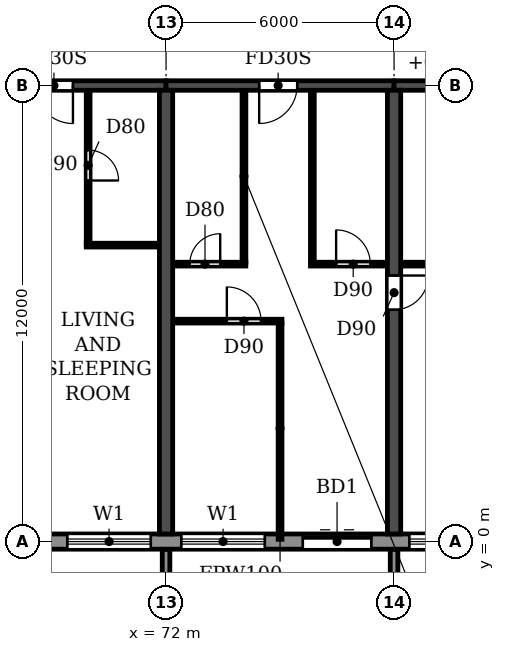
"""IFC4 building model, lengths in metres.
Left out: names, types, materials, properties, quantities, classifications, styles, units other than length and angle.
Written with IfcOpenShell. Run it as: python <this file> out.ifc"""

import sys

from ifc_helpers import new_model, si_unit, direction, frame, frame_2d, origin, place, context, subcontext, project, spatial, polyline, rectangle, outline, extrude, source, transform, mapped, element, fill, save


model = new_model("IFC4")
c1 = context("Model", 3, precision=1e-05, world=origin(), true_north=direction((0.0, 1.0)))
c2 = subcontext(c1, "Body", "Model", "MODEL_VIEW")
j1 = project(units=[si_unit("LENGTHUNIT", "METRE"), si_unit("PLANEANGLEUNIT", "RADIAN")], contexts=[c1])
p1 = place(None, origin())
s1 = spatial("IfcSite", under=j1, at=p1, CompositionType="ELEMENT")
p2 = place(p1, origin())
s2 = spatial("IfcBuilding", under=s1, at=p2, CompositionType="ELEMENT")
p3 = place(p2, frame((0.0, 0.0, 72.9)))
s3 = spatial("IfcBuildingStorey", under=s2, at=p3, CompositionType="ELEMENT", Elevation=72.9)
p4 = place(p3, frame((72.0, 0.2, 0.0), z_axis=(0.0, 0.0, 1.0), x_axis=(0.0, 1.0, 0.0)))
e1 = element("IfcWall", 1, at=p4, inside=s3, PredefinedType="SHEAR", context=c2, shape_type="SweptSolid", body=[
    extrude(rectangle(XDim=11.675, YDim=0.35, at=frame_2d((5.837, 0.0))), origin(), (0.0, 0.0, 1.0), 3.06),
])
p5 = place(p3, frame((78.0, 0.2, 0.0), z_axis=(0.0, 0.0, 1.0), x_axis=(0.0, 1.0, 0.0)))
e2 = element("IfcWall", 2, at=p5, inside=s3, PredefinedType="SHEAR", context=c2, shape_type="SweptSolid", body=[
    extrude(rectangle(XDim=11.675, YDim=0.35, at=frame_2d((5.837, 0.0))), origin(), (0.0, 0.0, 1.0), 3.06),
])
p6 = place(p5, frame((5.9, 0.0, 0.0)))
e3 = element("IfcOpeningElement", 3, at=p6, cuts=e2, PredefinedType="OPENING", context=c2, shape_type="SweptSolid", body=[
    extrude(rectangle(XDim=0.9, YDim=2.1, at=frame_2d((0.45, 1.05))), frame((0.0, 0.185, 0.0), z_axis=(0.0, -1.0, 0.0), x_axis=(1.0, 0.0, 0.0)), (0.0, 0.0, 1.0), 0.37),
])
p7 = place(p3, frame((66.0, 12.0, 0.0), z_axis=(0.0, 0.0, 1.0), x_axis=(1.0, 0.0, 0.0)))
e4 = element("IfcWall", 4, at=p7, inside=s3, PredefinedType="SHEAR", context=c2, shape_type="SweptSolid", body=[
    extrude(rectangle(XDim=6.0, YDim=0.25, at=frame_2d((3.0, 0.0))), origin(), (0.0, 0.0, 1.0), 2.46),
])
p8 = place(p7, frame((2.55, 0.0, 0.0)))
e5 = element("IfcOpeningElement", 5, at=p8, cuts=e4, PredefinedType="OPENING", context=c2, shape_type="SweptSolid", body=[
    extrude(rectangle(XDim=1.0, YDim=2.1, at=frame_2d((0.5, 1.05))), frame((0.0, 0.135, 0.0), z_axis=(0.0, -1.0, 0.0), x_axis=(1.0, 0.0, 0.0)), (0.0, 0.0, 1.0), 0.27),
])
p9 = place(p3, frame((72.0, 12.0, 0.0), z_axis=(0.0, 0.0, 1.0), x_axis=(1.0, 0.0, 0.0)))
e6 = element("IfcWall", 6, at=p9, inside=s3, PredefinedType="SHEAR", context=c2, shape_type="SweptSolid", body=[
    extrude(rectangle(XDim=6.0, YDim=0.25, at=frame_2d((3.0, 0.0))), origin(), (0.0, 0.0, 1.0), 2.46),
])
p10 = place(p9, frame((2.45, 0.0, 0.0)))
e7 = element("IfcOpeningElement", 7, at=p10, cuts=e6, PredefinedType="OPENING", context=c2, shape_type="SweptSolid", body=[
    extrude(rectangle(XDim=1.0, YDim=2.1, at=frame_2d((0.5, 1.05))), frame((0.0, 0.135, 0.0), z_axis=(0.0, -1.0, 0.0), x_axis=(1.0, 0.0, 0.0)), (0.0, 0.0, 1.0), 0.27),
])
p11 = place(p3, frame((78.0, 12.0, 0.0), z_axis=(0.0, 0.0, 1.0), x_axis=(1.0, 0.0, 0.0)))
e8 = element("IfcWall", 8, at=p11, inside=s3, PredefinedType="SHEAR", context=c2, shape_type="SweptSolid", body=[
    extrude(rectangle(XDim=6.0, YDim=0.25, at=frame_2d((3.0, 0.0))), origin(), (0.0, 0.0, 1.0), 2.46),
])
p12 = place(p3, frame((10.683, 0.0, 0.0), z_axis=(0.0, 0.0, 1.0), x_axis=(1.0, 0.0, 0.0)))
e9 = element("IfcWall", 9, at=p12, inside=s3, PredefinedType="STANDARD", context=c2, shape_type="SweptSolid", body=[
    extrude(rectangle(XDim=80.634, YDim=0.4, at=frame_2d((40.317, 0.0))), origin(), (0.0, 0.0, 1.0), 3.06),
])
p13 = place(p12, frame((1.717, 0.0, 0.9)))
e10 = element("IfcOpeningElement", 10, at=p13, cuts=e9, PredefinedType="OPENING", context=c2, shape_type="SweptSolid", body=[
    extrude(rectangle(XDim=2.2, YDim=1.5, at=frame_2d((1.1, 0.75))), frame((0.0, 0.21, 0.0), z_axis=(0.0, -1.0, 0.0), x_axis=(1.0, 0.0, 0.0)), (0.0, 0.0, 1.0), 0.42),
])
p14 = place(p12, frame((4.917, 0.0, 0.0)))
e11 = element("IfcOpeningElement", 11, at=p14, cuts=e9, PredefinedType="OPENING", context=c2, shape_type="SweptSolid", body=[
    extrude(rectangle(XDim=1.8, YDim=2.4, at=frame_2d((0.9, 1.2))), frame((0.0, 0.21, 0.0), z_axis=(0.0, -1.0, 0.0), x_axis=(1.0, 0.0, 0.0)), (0.0, 0.0, 1.0), 0.42),
])
p15 = place(p12, frame((7.717, 0.0, 0.9)))
e12 = element("IfcOpeningElement", 12, at=p15, cuts=e9, PredefinedType="OPENING", context=c2, shape_type="SweptSolid", body=[
    extrude(rectangle(XDim=2.2, YDim=1.5, at=frame_2d((1.1, 0.75))), frame((0.0, 0.21, 0.0), z_axis=(0.0, -1.0, 0.0), x_axis=(1.0, 0.0, 0.0)), (0.0, 0.0, 1.0), 0.42),
])
p16 = place(p12, frame((10.717, 0.0, 0.9)))
e13 = element("IfcOpeningElement", 13, at=p16, cuts=e9, PredefinedType="OPENING", context=c2, shape_type="SweptSolid", body=[
    extrude(rectangle(XDim=2.2, YDim=1.5, at=frame_2d((1.1, 0.75))), frame((0.0, 0.21, 0.0), z_axis=(0.0, -1.0, 0.0), x_axis=(1.0, 0.0, 0.0)), (0.0, 0.0, 1.0), 0.42),
])
p17 = place(p12, frame((13.717, 0.0, 0.9)))
e14 = element("IfcOpeningElement", 14, at=p17, cuts=e9, PredefinedType="OPENING", context=c2, shape_type="SweptSolid", body=[
    extrude(rectangle(XDim=2.2, YDim=1.5, at=frame_2d((1.1, 0.75))), frame((0.0, 0.21, 0.0), z_axis=(0.0, -1.0, 0.0), x_axis=(1.0, 0.0, 0.0)), (0.0, 0.0, 1.0), 0.42),
])
p18 = place(p12, frame((16.917, 0.0, 0.0)))
e15 = element("IfcOpeningElement", 15, at=p18, cuts=e9, PredefinedType="OPENING", context=c2, shape_type="SweptSolid", body=[
    extrude(rectangle(XDim=1.8, YDim=2.4, at=frame_2d((0.9, 1.2))), frame((0.0, 0.21, 0.0), z_axis=(0.0, -1.0, 0.0), x_axis=(1.0, 0.0, 0.0)), (0.0, 0.0, 1.0), 0.42),
])
p19 = place(p12, frame((19.717, 0.0, 0.9)))
e16 = element("IfcOpeningElement", 16, at=p19, cuts=e9, PredefinedType="OPENING", context=c2, shape_type="SweptSolid", body=[
    extrude(rectangle(XDim=2.2, YDim=1.5, at=frame_2d((1.1, 0.75))), frame((0.0, 0.21, 0.0), z_axis=(0.0, -1.0, 0.0), x_axis=(1.0, 0.0, 0.0)), (0.0, 0.0, 1.0), 0.42),
])
p20 = place(p12, frame((22.717, 0.0, 0.9)))
e17 = element("IfcOpeningElement", 17, at=p20, cuts=e9, PredefinedType="OPENING", context=c2, shape_type="SweptSolid", body=[
    extrude(rectangle(XDim=2.2, YDim=1.5, at=frame_2d((1.1, 0.75))), frame((0.0, 0.21, 0.0), z_axis=(0.0, -1.0, 0.0), x_axis=(1.0, 0.0, 0.0)), (0.0, 0.0, 1.0), 0.42),
])
p21 = place(p12, frame((25.917, 0.0, 0.0)))
e18 = element("IfcOpeningElement", 18, at=p21, cuts=e9, PredefinedType="OPENING", context=c2, shape_type="SweptSolid", body=[
    extrude(rectangle(XDim=1.8, YDim=2.4, at=frame_2d((0.9, 1.2))), frame((0.0, 0.21, 0.0), z_axis=(0.0, -1.0, 0.0), x_axis=(1.0, 0.0, 0.0)), (0.0, 0.0, 1.0), 0.42),
])
p22 = place(p12, frame((28.717, 0.0, 0.9)))
e19 = element("IfcOpeningElement", 19, at=p22, cuts=e9, PredefinedType="OPENING", context=c2, shape_type="SweptSolid", body=[
    extrude(rectangle(XDim=2.2, YDim=1.5, at=frame_2d((1.1, 0.75))), frame((0.0, 0.21, 0.0), z_axis=(0.0, -1.0, 0.0), x_axis=(1.0, 0.0, 0.0)), (0.0, 0.0, 1.0), 0.42),
])
p23 = place(p12, frame((31.717, 0.0, 0.9)))
e20 = element("IfcOpeningElement", 20, at=p23, cuts=e9, PredefinedType="OPENING", context=c2, shape_type="SweptSolid", body=[
    extrude(rectangle(XDim=2.2, YDim=1.5, at=frame_2d((1.1, 0.75))), frame((0.0, 0.21, 0.0), z_axis=(0.0, -1.0, 0.0), x_axis=(1.0, 0.0, 0.0)), (0.0, 0.0, 1.0), 0.42),
])
p24 = place(p12, frame((34.717, 0.0, 0.9)))
e21 = element("IfcOpeningElement", 21, at=p24, cuts=e9, PredefinedType="OPENING", context=c2, shape_type="SweptSolid", body=[
    extrude(rectangle(XDim=2.2, YDim=1.5, at=frame_2d((1.1, 0.75))), frame((0.0, 0.21, 0.0), z_axis=(0.0, -1.0, 0.0), x_axis=(1.0, 0.0, 0.0)), (0.0, 0.0, 1.0), 0.42),
])
p25 = place(p12, frame((37.917, 0.0, 0.0)))
e22 = element("IfcOpeningElement", 22, at=p25, cuts=e9, PredefinedType="OPENING", context=c2, shape_type="SweptSolid", body=[
    extrude(rectangle(XDim=1.8, YDim=2.4, at=frame_2d((0.9, 1.2))), frame((0.0, 0.21, 0.0), z_axis=(0.0, -1.0, 0.0), x_axis=(1.0, 0.0, 0.0)), (0.0, 0.0, 1.0), 0.42),
])
p26 = place(p12, frame((40.717, 0.0, 0.9)))
e23 = element("IfcOpeningElement", 23, at=p26, cuts=e9, PredefinedType="OPENING", context=c2, shape_type="SweptSolid", body=[
    extrude(rectangle(XDim=2.2, YDim=1.5, at=frame_2d((1.1, 0.75))), frame((0.0, 0.21, 0.0), z_axis=(0.0, -1.0, 0.0), x_axis=(1.0, 0.0, 0.0)), (0.0, 0.0, 1.0), 0.42),
])
p27 = place(p12, frame((43.717, 0.0, 0.9)))
e24 = element("IfcOpeningElement", 24, at=p27, cuts=e9, PredefinedType="OPENING", context=c2, shape_type="SweptSolid", body=[
    extrude(rectangle(XDim=2.2, YDim=1.5, at=frame_2d((1.1, 0.75))), frame((0.0, 0.21, 0.0), z_axis=(0.0, -1.0, 0.0), x_axis=(1.0, 0.0, 0.0)), (0.0, 0.0, 1.0), 0.42),
])
p28 = place(p12, frame((46.717, 0.0, 0.9)))
e25 = element("IfcOpeningElement", 25, at=p28, cuts=e9, PredefinedType="OPENING", context=c2, shape_type="SweptSolid", body=[
    extrude(rectangle(XDim=2.2, YDim=1.5, at=frame_2d((1.1, 0.75))), frame((0.0, 0.21, 0.0), z_axis=(0.0, -1.0, 0.0), x_axis=(1.0, 0.0, 0.0)), (0.0, 0.0, 1.0), 0.42),
])
p29 = place(p12, frame((49.917, 0.0, 0.0)))
e26 = element("IfcOpeningElement", 26, at=p29, cuts=e9, PredefinedType="OPENING", context=c2, shape_type="SweptSolid", body=[
    extrude(rectangle(XDim=1.8, YDim=2.4, at=frame_2d((0.9, 1.2))), frame((0.0, 0.21, 0.0), z_axis=(0.0, -1.0, 0.0), x_axis=(1.0, 0.0, 0.0)), (0.0, 0.0, 1.0), 0.42),
])
p30 = place(p12, frame((52.717, 0.0, 0.9)))
e27 = element("IfcOpeningElement", 27, at=p30, cuts=e9, PredefinedType="OPENING", context=c2, shape_type="SweptSolid", body=[
    extrude(rectangle(XDim=2.2, YDim=1.5, at=frame_2d((1.1, 0.75))), frame((0.0, 0.21, 0.0), z_axis=(0.0, -1.0, 0.0), x_axis=(1.0, 0.0, 0.0)), (0.0, 0.0, 1.0), 0.42),
])
p31 = place(p12, frame((55.717, 0.0, 0.9)))
e28 = element("IfcOpeningElement", 28, at=p31, cuts=e9, PredefinedType="OPENING", context=c2, shape_type="SweptSolid", body=[
    extrude(rectangle(XDim=2.2, YDim=1.5, at=frame_2d((1.1, 0.75))), frame((0.0, 0.21, 0.0), z_axis=(0.0, -1.0, 0.0), x_axis=(1.0, 0.0, 0.0)), (0.0, 0.0, 1.0), 0.42),
])
p32 = place(p12, frame((58.717, 0.0, 0.9)))
e29 = element("IfcOpeningElement", 29, at=p32, cuts=e9, PredefinedType="OPENING", context=c2, shape_type="SweptSolid", body=[
    extrude(rectangle(XDim=2.2, YDim=1.5, at=frame_2d((1.1, 0.75))), frame((0.0, 0.21, 0.0), z_axis=(0.0, -1.0, 0.0), x_axis=(1.0, 0.0, 0.0)), (0.0, 0.0, 1.0), 0.42),
])
p33 = place(p12, frame((61.717, 0.0, 0.9)))
e30 = element("IfcOpeningElement", 30, at=p33, cuts=e9, PredefinedType="OPENING", context=c2, shape_type="SweptSolid", body=[
    extrude(rectangle(XDim=2.2, YDim=1.5, at=frame_2d((1.1, 0.75))), frame((0.0, 0.21, 0.0), z_axis=(0.0, -1.0, 0.0), x_axis=(1.0, 0.0, 0.0)), (0.0, 0.0, 1.0), 0.42),
])
p34 = place(p12, frame((64.917, 0.0, 0.0)))
e31 = element("IfcOpeningElement", 31, at=p34, cuts=e9, PredefinedType="OPENING", context=c2, shape_type="SweptSolid", body=[
    extrude(rectangle(XDim=1.8, YDim=2.4, at=frame_2d((0.9, 1.2))), frame((0.0, 0.21, 0.0), z_axis=(0.0, -1.0, 0.0), x_axis=(1.0, 0.0, 0.0)), (0.0, 0.0, 1.0), 0.42),
])
p35 = place(p12, frame((67.717, 0.0, 0.9)))
e32 = element("IfcOpeningElement", 32, at=p35, cuts=e9, PredefinedType="OPENING", context=c2, shape_type="SweptSolid", body=[
    extrude(rectangle(XDim=2.2, YDim=1.5, at=frame_2d((1.1, 0.75))), frame((0.0, 0.21, 0.0), z_axis=(0.0, -1.0, 0.0), x_axis=(1.0, 0.0, 0.0)), (0.0, 0.0, 1.0), 0.42),
])
p36 = place(p12, frame((70.717, 0.0, 0.9)))
e33 = element("IfcOpeningElement", 33, at=p36, cuts=e9, PredefinedType="OPENING", context=c2, shape_type="SweptSolid", body=[
    extrude(rectangle(XDim=2.2, YDim=1.5, at=frame_2d((1.1, 0.75))), frame((0.0, 0.21, 0.0), z_axis=(0.0, -1.0, 0.0), x_axis=(1.0, 0.0, 0.0)), (0.0, 0.0, 1.0), 0.42),
])
p37 = place(p12, frame((73.917, 0.0, 0.0)))
e34 = element("IfcOpeningElement", 34, at=p37, cuts=e9, PredefinedType="OPENING", context=c2, shape_type="SweptSolid", body=[
    extrude(rectangle(XDim=1.8, YDim=2.4, at=frame_2d((0.9, 1.2))), frame((0.0, 0.21, 0.0), z_axis=(0.0, -1.0, 0.0), x_axis=(1.0, 0.0, 0.0)), (0.0, 0.0, 1.0), 0.42),
])
p38 = place(p12, frame((76.717, 0.0, 0.9)))
e35 = element("IfcOpeningElement", 35, at=p38, cuts=e9, PredefinedType="OPENING", context=c2, shape_type="SweptSolid", body=[
    extrude(rectangle(XDim=2.2, YDim=1.5, at=frame_2d((1.1, 0.75))), frame((0.0, 0.21, 0.0), z_axis=(0.0, -1.0, 0.0), x_axis=(1.0, 0.0, 0.0)), (0.0, 0.0, 1.0), 0.42),
])
m1 = source(origin(), c2, "Body", "SweptSolid", [
    extrude(outline(polyline([(0.0, 0.0), (0.2, 0.0), (0.2, 1.65), (0.0, 1.65), (0.0, 0.0)])), origin(), (0.0, 0.0, 1.0), 3.1),
])
for number, where in (
    (36, (71.9, -1.85, 0.0)),
    (37, (77.9, -1.85, 0.0)),
):
    element("IfcWall", number, at=place(p3, frame(where)), inside=s3, PredefinedType="STANDARD", context=c2, shape_type="MappedRepresentation", body=[
        mapped(m1, transform((0.0, 0.0, 0.0))),
    ])
p39 = place(p3, frame((72.185, 5.8, 0.0), z_axis=(0.0, 0.0, 1.0), x_axis=(1.0, 0.0, 0.0)))
e38 = element("IfcWall", 38, at=p39, inside=s3, PredefinedType="PARTITIONING", context=c2, shape_type="SweptSolid", body=[
    extrude(rectangle(XDim=2.865, YDim=0.1, at=frame_2d((1.433, 0.0))), origin(), (0.0, 0.0, 1.0), 3.06),
])
p40 = place(p39, frame((1.415, 0.0, 0.0)))
e39 = element("IfcOpeningElement", 39, at=p40, cuts=e38, PredefinedType="OPENING", context=c2, shape_type="SweptSolid", body=[
    extrude(rectangle(XDim=0.9, YDim=2.1, at=frame_2d((0.45, 1.05))), frame((0.0, 0.06, 0.0), z_axis=(0.0, -1.0, 0.0), x_axis=(1.0, 0.0, 0.0)), (0.0, 0.0, 1.0), 0.12),
])
p41 = place(p3, frame((72.185, 7.3, 0.0), z_axis=(0.0, 0.0, 1.0), x_axis=(1.0, 0.0, 0.0)))
e40 = element("IfcWall", 40, at=p41, inside=s3, PredefinedType="PARTITIONING", context=c2, shape_type="SweptSolid", body=[
    extrude(rectangle(XDim=1.915, YDim=0.1, at=frame_2d((0.958, 0.0))), origin(), (0.0, 0.0, 1.0), 3.06),
])
p42 = place(p41, frame((0.44, 0.0, 0.0)))
e41 = element("IfcOpeningElement", 41, at=p42, cuts=e40, PredefinedType="OPENING", context=c2, shape_type="SweptSolid", body=[
    extrude(rectangle(XDim=0.8, YDim=2.1, at=frame_2d((0.4, 1.05))), frame((0.0, 0.06, 0.0), z_axis=(0.0, -1.0, 0.0), x_axis=(1.0, 0.0, 0.0)), (0.0, 0.0, 1.0), 0.12),
])
p43 = place(p3, frame((75.8, 7.3, 0.0), z_axis=(0.0, 0.0, 1.0), x_axis=(1.0, 0.0, 0.0)))
e42 = element("IfcWall", 42, at=p43, inside=s3, PredefinedType="PARTITIONING", context=c2, shape_type="SweptSolid", body=[
    extrude(rectangle(XDim=2.015, YDim=0.1, at=frame_2d((1.007, 0.0))), origin(), (0.0, 0.0, 1.0), 3.06),
])
p44 = place(p43, frame((0.675, 0.0, 0.0)))
e43 = element("IfcOpeningElement", 43, at=p44, cuts=e42, PredefinedType="OPENING", context=c2, shape_type="SweptSolid", body=[
    extrude(rectangle(XDim=0.9, YDim=2.1, at=frame_2d((0.45, 1.05))), frame((0.0, 0.06, 0.0), z_axis=(0.0, -1.0, 0.0), x_axis=(1.0, 0.0, 0.0)), (0.0, 0.0, 1.0), 0.12),
])
p45 = place(p3, frame((78.185, 7.3, 0.0), z_axis=(0.0, 0.0, 1.0), x_axis=(1.0, 0.0, 0.0)))
e44 = element("IfcWall", 44, at=p45, inside=s3, PredefinedType="PARTITIONING", context=c2, shape_type="SweptSolid", body=[
    extrude(rectangle(XDim=2.715, YDim=0.1, at=frame_2d((1.357, 0.0))), origin(), (0.0, 0.0, 1.0), 3.06),
])
p46 = place(p45, frame((0.915, 0.0, 0.0)))
e45 = element("IfcOpeningElement", 45, at=p46, cuts=e44, PredefinedType="OPENING", context=c2, shape_type="SweptSolid", body=[
    extrude(rectangle(XDim=0.8, YDim=2.1, at=frame_2d((0.4, 1.05))), frame((0.0, 0.06, 0.0), z_axis=(0.0, -1.0, 0.0), x_axis=(1.0, 0.0, 0.0)), (0.0, 0.0, 1.0), 0.12),
])
p47 = place(p3, frame((69.9, 7.8, 0.0), z_axis=(0.0, 0.0, 1.0), x_axis=(1.0, 0.0, 0.0)))
e46 = element("IfcWall", 46, at=p47, inside=s3, PredefinedType="PARTITIONING", context=c2, shape_type="SweptSolid", body=[
    extrude(rectangle(XDim=1.915, YDim=0.1, at=frame_2d((0.958, 0.0))), origin(), (0.0, 0.0, 1.0), 3.06),
])
p48 = place(p3, frame((69.95, 7.85, 0.0), z_axis=(0.0, 0.0, 1.0), x_axis=(0.0, 1.0, 0.0)))
e47 = element("IfcWall", 47, at=p48, inside=s3, PredefinedType="PARTITIONING", context=c2, shape_type="SweptSolid", body=[
    extrude(rectangle(XDim=4.015, YDim=0.1, at=frame_2d((2.007, 0.0))), origin(), (0.0, 0.0, 1.0), 3.06),
])
p49 = place(p48, frame((1.65, 0.0, 0.0)))
e48 = element("IfcOpeningElement", 48, at=p49, cuts=e47, PredefinedType="OPENING", context=c2, shape_type="SweptSolid", body=[
    extrude(rectangle(XDim=0.8, YDim=2.1, at=frame_2d((0.4, 1.05))), frame((0.0, 0.06, 0.0), z_axis=(0.0, -1.0, 0.0), x_axis=(1.0, 0.0, 0.0)), (0.0, 0.0, 1.0), 0.12),
])
p50 = place(p3, frame((74.05, 7.35, 0.0), z_axis=(0.0, 0.0, 1.0), x_axis=(0.0, 1.0, 0.0)))
e49 = element("IfcWall", 49, at=p50, inside=s3, PredefinedType="PARTITIONING", context=c2, shape_type="SweptSolid", body=[
    extrude(rectangle(XDim=4.515, YDim=0.1, at=frame_2d((2.257, 0.0))), origin(), (0.0, 0.0, 1.0), 3.06),
])
p51 = place(p3, frame((75.0, 0.06, 0.0), z_axis=(0.0, 0.0, 1.0), x_axis=(0.0, 1.0, 0.0)))
e50 = element("IfcWall", 50, at=p51, inside=s3, PredefinedType="PARTITIONING", context=c2, shape_type="SweptSolid", body=[
    extrude(rectangle(XDim=5.69, YDim=0.1, at=frame_2d((2.845, 0.0))), origin(), (0.0, 0.0, 1.0), 3.06),
])
p52 = place(p3, frame((75.85, 7.35, 0.0), z_axis=(0.0, 0.0, 1.0), x_axis=(0.0, 1.0, 0.0)))
e51 = element("IfcWall", 51, at=p52, inside=s3, PredefinedType="PARTITIONING", context=c2, shape_type="SweptSolid", body=[
    extrude(rectangle(XDim=4.515, YDim=0.1, at=frame_2d((2.257, 0.0))), origin(), (0.0, 0.0, 1.0), 3.06),
])
p53 = place(p32, origin())
e52 = element("IfcWindow", 52, at=p53, inside=s3, PartitioningType="DOUBLE_PANEL_HORIZONTAL", PredefinedType="WINDOW", context=c2, shape_type="SweptSolid", body=[
    extrude(rectangle(XDim=2.2, YDim=1.5, at=frame_2d((1.1, 0.75))), frame((0.0, 0.03, 0.0), z_axis=(0.0, -1.0, 0.0), x_axis=(1.0, 0.0, 0.0)), (0.0, 0.0, 1.0), 0.06),
])
fill(e29, e52)
p54 = place(p33, origin())
e53 = element("IfcWindow", 53, at=p54, inside=s3, PartitioningType="DOUBLE_PANEL_HORIZONTAL", PredefinedType="WINDOW", context=c2, shape_type="SweptSolid", body=[
    extrude(rectangle(XDim=2.2, YDim=1.5, at=frame_2d((1.1, 0.75))), frame((0.0, 0.03, 0.0), z_axis=(0.0, -1.0, 0.0), x_axis=(1.0, 0.0, 0.0)), (0.0, 0.0, 1.0), 0.06),
])
fill(e30, e53)
p55 = place(p34, origin())
e54 = element("IfcDoor", 54, at=p55, inside=s3, OperationType="DOUBLE_DOOR_SLIDING", PredefinedType="DOOR", context=c2, shape_type="SweptSolid", body=[
    extrude(rectangle(XDim=1.8, YDim=2.4, at=frame_2d((0.9, 1.2))), frame((0.0, 0.025, 0.0), z_axis=(0.0, -1.0, 0.0), x_axis=(1.0, 0.0, 0.0)), (0.0, 0.0, 1.0), 0.05),
])
fill(e31, e54)
p56 = place(p35, origin())
e55 = element("IfcWindow", 55, at=p56, inside=s3, PartitioningType="DOUBLE_PANEL_HORIZONTAL", PredefinedType="WINDOW", context=c2, shape_type="SweptSolid", body=[
    extrude(rectangle(XDim=2.2, YDim=1.5, at=frame_2d((1.1, 0.75))), frame((0.0, 0.03, 0.0), z_axis=(0.0, -1.0, 0.0), x_axis=(1.0, 0.0, 0.0)), (0.0, 0.0, 1.0), 0.06),
])
fill(e32, e55)
p57 = place(p8, frame((1.0, 0.0, 0.0), z_axis=(0.0, 0.0, 1.0), x_axis=(-1.0, 0.0, 0.0)))
e56 = element("IfcDoor", 56, at=p57, inside=s3, OperationType="SINGLE_SWING_LEFT", PredefinedType="DOOR", context=c2, shape_type="SweptSolid", body=[
    extrude(rectangle(XDim=1.0, YDim=2.1, at=frame_2d((0.5, 1.05))), frame((0.0, 0.025, 0.0), z_axis=(0.0, -1.0, 0.0), x_axis=(1.0, 0.0, 0.0)), (0.0, 0.0, 1.0), 0.05),
])
fill(e5, e56)
p58 = place(p49, frame((0.8, 0.0, 0.0), z_axis=(0.0, 0.0, 1.0), x_axis=(-1.0, 0.0, 0.0)))
e57 = element("IfcDoor", 57, at=p58, inside=s3, OperationType="SINGLE_SWING_RIGHT", PredefinedType="DOOR", context=c2, shape_type="SweptSolid", body=[
    extrude(rectangle(XDim=0.8, YDim=2.1, at=frame_2d((0.4, 1.05))), frame((0.0, 0.025, 0.0), z_axis=(0.0, -1.0, 0.0), x_axis=(1.0, 0.0, 0.0)), (0.0, 0.0, 1.0), 0.05),
])
fill(e48, e57)
p59 = place(p42, origin())
e58 = element("IfcDoor", 58, at=p59, inside=s3, OperationType="SINGLE_SWING_RIGHT", PredefinedType="DOOR", context=c2, shape_type="SweptSolid", body=[
    extrude(rectangle(XDim=0.8, YDim=2.1, at=frame_2d((0.4, 1.05))), frame((0.0, 0.025, 0.0), z_axis=(0.0, -1.0, 0.0), x_axis=(1.0, 0.0, 0.0)), (0.0, 0.0, 1.0), 0.05),
])
fill(e41, e58)
p60 = place(p40, origin())
e59 = element("IfcDoor", 59, at=p60, inside=s3, OperationType="SINGLE_SWING_LEFT", PredefinedType="DOOR", context=c2, shape_type="SweptSolid", body=[
    extrude(rectangle(XDim=0.9, YDim=2.1, at=frame_2d((0.45, 1.05))), frame((0.0, 0.025, 0.0), z_axis=(0.0, -1.0, 0.0), x_axis=(1.0, 0.0, 0.0)), (0.0, 0.0, 1.0), 0.05),
])
fill(e39, e59)
p61 = place(p10, frame((1.0, 0.0, 0.0), z_axis=(0.0, 0.0, 1.0), x_axis=(-1.0, 0.0, 0.0)))
e60 = element("IfcDoor", 60, at=p61, inside=s3, OperationType="SINGLE_SWING_RIGHT", PredefinedType="DOOR", context=c2, shape_type="SweptSolid", body=[
    extrude(rectangle(XDim=1.0, YDim=2.1, at=frame_2d((0.5, 1.05))), frame((0.0, 0.025, 0.0), z_axis=(0.0, -1.0, 0.0), x_axis=(1.0, 0.0, 0.0)), (0.0, 0.0, 1.0), 0.05),
])
fill(e7, e60)
p62 = place(p44, origin())
e61 = element("IfcDoor", 61, at=p62, inside=s3, OperationType="SINGLE_SWING_LEFT", PredefinedType="DOOR", context=c2, shape_type="SweptSolid", body=[
    extrude(rectangle(XDim=0.9, YDim=2.1, at=frame_2d((0.45, 1.05))), frame((0.0, 0.025, 0.0), z_axis=(0.0, -1.0, 0.0), x_axis=(1.0, 0.0, 0.0)), (0.0, 0.0, 1.0), 0.05),
])
fill(e43, e61)
p63 = place(p6, frame((0.9, 0.0, 0.0), z_axis=(0.0, 0.0, 1.0), x_axis=(-1.0, 0.0, 0.0)))
e62 = element("IfcDoor", 62, at=p63, inside=s3, OperationType="SINGLE_SWING_LEFT", PredefinedType="DOOR", context=c2, shape_type="SweptSolid", body=[
    extrude(rectangle(XDim=0.9, YDim=2.1, at=frame_2d((0.45, 1.05))), frame((0.0, 0.025, 0.0), z_axis=(0.0, -1.0, 0.0), x_axis=(1.0, 0.0, 0.0)), (0.0, 0.0, 1.0), 0.05),
])
fill(e3, e62)
save(model, sys.argv[1])
